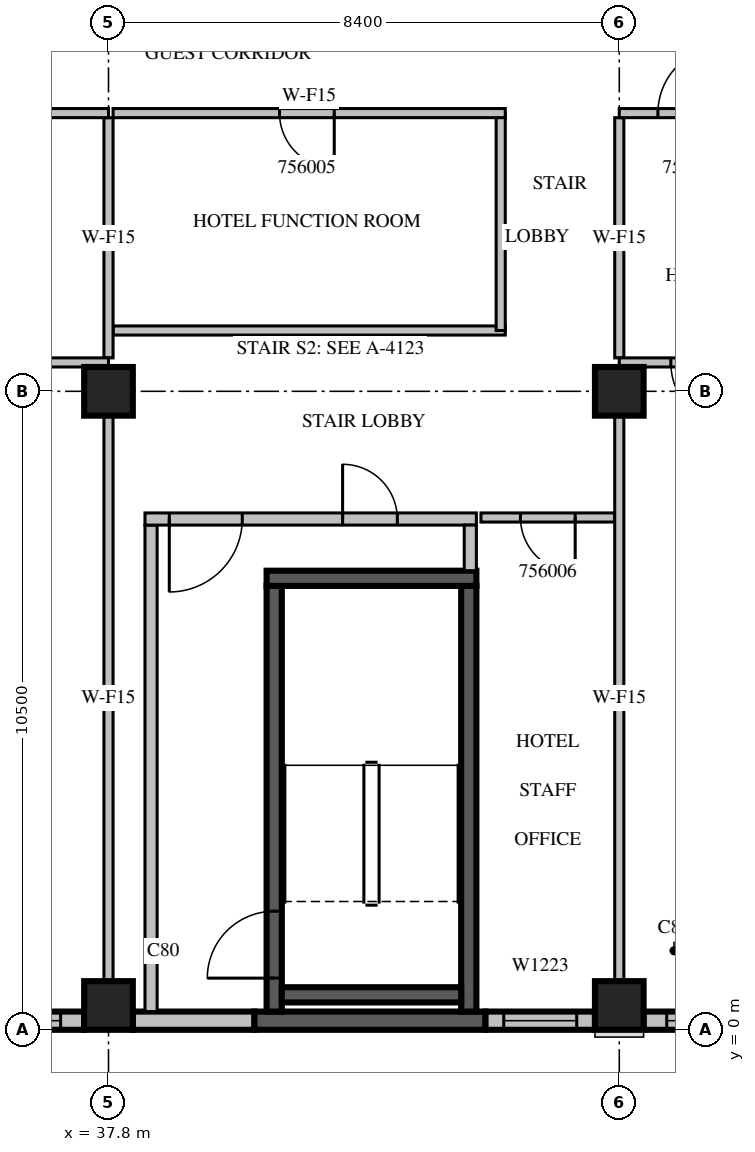
"""IFC4 building model, lengths in metres.
Left out: names, types, materials, properties, quantities, classifications, styles, units other than length and angle.
Written with IfcOpenShell. Run it as: python <this file> out.ifc"""

import sys

from ifc_helpers import new_model, si_unit, direction, frame, frame_2d, origin, origin_2d, place, context, subcontext, project, spatial, rectangle, extrude, source, transform, mapped, element, fill, save


model = new_model("IFC4")
c1 = context("Model", 3, precision=1e-05, world=origin(), true_north=direction((0.0, 1.0)))
c2 = subcontext(c1, "Body", "Model", "MODEL_VIEW")
j1 = project(units=[si_unit("LENGTHUNIT", "METRE"), si_unit("PLANEANGLEUNIT", "RADIAN")], contexts=[c1])
p1 = place(None, origin())
s1 = spatial("IfcSite", under=j1, at=p1, CompositionType="ELEMENT")
p2 = place(p1, origin())
s2 = spatial("IfcBuilding", under=s1, at=p2, CompositionType="ELEMENT")
p3 = place(p2, frame((0.0, 0.0, 246.2)))
s3 = spatial("IfcBuildingStorey", under=s2, at=p3, CompositionType="ELEMENT", Elevation=246.2)
m1 = source(origin(), c2, "Body", "SweptSolid", [
    extrude(rectangle(XDim=0.8, YDim=0.8, at=origin_2d()), origin(), (0.0, 0.0, 1.0), 3.8),
])
for number, where, z_axis, x_axis in (
    (1, (37.8, 0.4, 0.0), (0.0, 0.0, 1.0), (1.0, 0.0, 0.0)),
    (2, (46.2, 0.4, 0.0), (0.0, 0.0, 1.0), (1.0, 0.0, 0.0)),
    (3, (37.8, 10.5, 0.0), (0.0, 0.0, 1.0), (1.0, 0.0, 0.0)),
    (4, (46.2, 10.5, 0.0), (0.0, 0.0, 1.0), (1.0, 0.0, 0.0)),
):
    element("IfcColumn", number, at=place(p3, frame(where, z_axis=z_axis, x_axis=x_axis)), inside=s3, PredefinedType="COLUMN", context=c2, shape_type="MappedRepresentation", body=[
        mapped(m1, transform((0.0, 0.0, 0.0), scale=1.0)),
    ])
m2 = source(origin(), c2, "Body", "SweptSolid", [
    extrude(rectangle(XDim=7.6, YDim=0.3, at=frame_2d((3.8, 0.0))), origin(), (0.0, 0.0, 1.0), 3.4),
])
p4 = place(p3, frame((29.8, 0.15, 0.0), z_axis=(0.0, 0.0, 1.0), x_axis=(1.0, 0.0, 0.0)))
e5 = element("IfcWall", 5, at=p4, inside=s3, PredefinedType="STANDARD", context=c2, shape_type="MappedRepresentation", body=[
    mapped(m2, transform((0.0, 0.0, 0.0), scale=1.0)),
])
m3 = source(origin(), c2, "Body", "SweptSolid", [
    extrude(rectangle(XDim=1.2, YDim=2.3, at=frame_2d((0.6, 1.15))), frame((0.0, 0.16, 0.0), z_axis=(0.0, -1.0, 0.0), x_axis=(1.0, 0.0, 0.0)), (0.0, 0.0, 1.0), 0.32),
])
p5 = place(p4, frame((0.487, 0.0, 0.6)))
e6 = element("IfcOpeningElement", 6, at=p5, cuts=e5, PredefinedType="OPENING", context=c2, shape_type="MappedRepresentation", body=[
    mapped(m3, transform((0.0, 0.0, 0.0), scale=1.0)),
])
p6 = place(p4, frame((6.013, 0.0, 0.6)))
e7 = element("IfcOpeningElement", 7, at=p6, cuts=e5, PredefinedType="OPENING", context=c2, shape_type="MappedRepresentation", body=[
    mapped(m3, transform((0.0, 0.0, 0.0), scale=1.0)),
])
m4 = source(origin(), c2, "Body", "SweptSolid", [
    extrude(rectangle(XDim=2.4, YDim=2.3, at=frame_2d((1.2, 1.15))), frame((0.0, 0.16, 0.0), z_axis=(0.0, -1.0, 0.0), x_axis=(1.0, 0.0, 0.0)), (0.0, 0.0, 1.0), 0.32),
])
p7 = place(p4, frame((2.65, 0.0, 0.6)))
e8 = element("IfcOpeningElement", 8, at=p7, cuts=e5, PredefinedType="OPENING", context=c2, shape_type="MappedRepresentation", body=[
    mapped(m4, transform((0.0, 0.0, 0.0), scale=1.0)),
])
m5 = source(origin(), c2, "Body", "SweptSolid", [
    extrude(rectangle(XDim=2.0, YDim=0.3, at=frame_2d((1.0, 0.0))), origin(), (0.0, 0.0, 1.0), 3.4),
])
p8 = place(p3, frame((38.2, 0.15, 0.0), z_axis=(0.0, 0.0, 1.0), x_axis=(1.0, 0.0, 0.0)))
e9 = element("IfcWall", 9, at=p8, inside=s3, PredefinedType="STANDARD", context=c2, shape_type="MappedRepresentation", body=[
    mapped(m5, transform((0.0, 0.0, 0.0), scale=1.0)),
])
m6 = source(origin(), c2, "Body", "SweptSolid", [
    extrude(rectangle(XDim=3.8, YDim=0.3, at=frame_2d((1.9, 0.0))), origin(), (0.0, 0.0, 1.0), 3.4),
])
p9 = place(p3, frame((40.2, 0.15, 0.0), z_axis=(0.0, 0.0, 1.0), x_axis=(1.0, 0.0, 0.0)))
e10 = element("IfcWall", 10, at=p9, inside=s3, PredefinedType="SOLIDWALL", context=c2, shape_type="MappedRepresentation", body=[
    mapped(m6, transform((0.0, 0.0, 0.0), scale=1.0)),
])
m7 = source(origin(), c2, "Body", "SweptSolid", [
    extrude(rectangle(XDim=1.8, YDim=0.3, at=frame_2d((0.9, 0.0))), origin(), (0.0, 0.0, 1.0), 3.4),
])
p10 = place(p3, frame((44.0, 0.15, 0.0), z_axis=(0.0, 0.0, 1.0), x_axis=(1.0, 0.0, 0.0)))
e11 = element("IfcWall", 11, at=p10, inside=s3, PredefinedType="STANDARD", context=c2, shape_type="MappedRepresentation", body=[
    mapped(m7, transform((0.0, 0.0, 0.0), scale=1.0)),
])
p11 = place(p10, frame((0.3, 0.0, 0.6)))
e12 = element("IfcOpeningElement", 12, at=p11, cuts=e11, PredefinedType="OPENING", context=c2, shape_type="MappedRepresentation", body=[
    mapped(m3, transform((0.0, 0.0, 0.0), scale=1.0)),
])
m8 = source(origin(), c2, "Body", "SweptSolid", [
    extrude(rectangle(XDim=2.96, YDim=0.3, at=frame_2d((1.48, 0.0))), origin(), (0.0, 0.0, 1.0), 3.4),
])
p12 = place(p3, frame((46.6, 0.15, 0.0), z_axis=(0.0, 0.0, 1.0), x_axis=(1.0, 0.0, 0.0)))
e13 = element("IfcWall", 13, at=p12, inside=s3, PredefinedType="STANDARD", context=c2, shape_type="MappedRepresentation", body=[
    mapped(m8, transform((0.0, 0.0, 0.0), scale=1.0)),
])
m9 = source(origin(), c2, "Body", "SweptSolid", [
    extrude(rectangle(XDim=1.8, YDim=2.3, at=frame_2d((0.9, 1.15))), frame((0.0, 0.16, 0.0), z_axis=(0.0, -1.0, 0.0), x_axis=(1.0, 0.0, 0.0)), (0.0, 0.0, 1.0), 0.32),
])
p13 = place(p12, frame((0.38, 0.0, 0.6)))
e14 = element("IfcOpeningElement", 14, at=p13, cuts=e13, PredefinedType="OPENING", context=c2, shape_type="MappedRepresentation", body=[
    mapped(m9, transform((0.0, 0.0, 0.0), scale=1.0)),
])
m10 = source(origin(), c2, "Body", "SweptSolid", [
    extrude(rectangle(XDim=7.0, YDim=0.25, at=frame_2d((3.5, 0.0))), origin(), (0.0, 0.0, 1.0), 3.4),
])
p14 = place(p3, frame((40.525, 0.3, 0.0), z_axis=(0.0, 0.0, 1.0), x_axis=(0.0, 1.0, 0.0)))
e15 = element("IfcWall", 15, at=p14, inside=s3, PredefinedType="SOLIDWALL", context=c2, shape_type="MappedRepresentation", body=[
    mapped(m10, transform((0.0, 0.0, 0.0), scale=1.0)),
])
m11 = source(origin(), c2, "Body", "SweptSolid", [
    extrude(rectangle(XDim=1.1, YDim=2.1, at=frame_2d((0.55, 1.05))), frame((0.0, 0.135, 0.0), z_axis=(0.0, -1.0, 0.0), x_axis=(1.0, 0.0, 0.0)), (0.0, 0.0, 1.0), 0.27),
])
p15 = place(p14, frame((0.55, 0.0, 0.0)))
e16 = element("IfcOpeningElement", 16, at=p15, cuts=e15, PredefinedType="OPENING", context=c2, shape_type="MappedRepresentation", body=[
    mapped(m11, transform((0.0, 0.0, 0.0), scale=1.0)),
])
p16 = place(p3, frame((43.725, 0.3, 0.0), z_axis=(0.0, 0.0, 1.0), x_axis=(0.0, 1.0, 0.0)))
e17 = element("IfcWall", 17, at=p16, inside=s3, PredefinedType="SOLIDWALL", context=c2, shape_type="MappedRepresentation", body=[
    mapped(m10, transform((0.0, 0.0, 0.0), scale=1.0)),
])
m12 = source(origin(), c2, "Body", "SweptSolid", [
    extrude(rectangle(XDim=3.45, YDim=0.25, at=frame_2d((1.725, 0.0))), origin(), (0.0, 0.0, 1.0), 3.4),
])
p17 = place(p3, frame((40.4, 7.425, 0.0), z_axis=(0.0, 0.0, 1.0), x_axis=(1.0, 0.0, 0.0)))
e18 = element("IfcWall", 18, at=p17, inside=s3, PredefinedType="SOLIDWALL", context=c2, shape_type="MappedRepresentation", body=[
    mapped(m12, transform((0.0, 0.0, 0.0), scale=1.0)),
])
m13 = source(origin(), c2, "Body", "SweptSolid", [
    extrude(rectangle(XDim=2.95, YDim=0.25, at=frame_2d((1.475, 0.0))), origin(), (0.0, 0.0, 1.0), 3.4),
])
p18 = place(p3, frame((40.65, 0.575, 0.0), z_axis=(0.0, 0.0, 1.0), x_axis=(1.0, 0.0, 0.0)))
e19 = element("IfcWall", 19, at=p18, inside=s3, PredefinedType="SOLIDWALL", context=c2, shape_type="MappedRepresentation", body=[
    mapped(m13, transform((0.0, 0.0, 0.0), scale=1.0)),
])
m14 = source(origin(), c2, "Body", "SweptSolid", [
    extrude(rectangle(XDim=8.0, YDim=0.2, at=frame_2d((4.0, 0.0))), origin(), (0.0, 0.0, 1.0), 3.4),
])
p19 = place(p3, frame((38.5, 0.3, 0.0), z_axis=(0.0, 0.0, 1.0), x_axis=(0.0, 1.0, 0.0)))
e20 = element("IfcWall", 20, at=p19, inside=s3, PredefinedType="PARTITIONING", context=c2, shape_type="MappedRepresentation", body=[
    mapped(m14, transform((0.0, 0.0, 0.0), scale=1.0)),
])
m15 = source(origin(), c2, "Body", "SweptSolid", [
    extrude(rectangle(XDim=5.45, YDim=0.2, at=frame_2d((2.725, 0.0))), origin(), (0.0, 0.0, 1.0), 3.4),
])
p20 = place(p3, frame((38.4, 8.4, 0.0), z_axis=(0.0, 0.0, 1.0), x_axis=(1.0, 0.0, 0.0)))
e21 = element("IfcWall", 21, at=p20, inside=s3, PredefinedType="PARTITIONING", context=c2, shape_type="MappedRepresentation", body=[
    mapped(m15, transform((0.0, 0.0, 0.0), scale=1.0)),
])
m16 = source(origin(), c2, "Body", "SweptSolid", [
    extrude(rectangle(XDim=1.2, YDim=2.1, at=frame_2d((0.6, 1.05))), frame((0.0, 0.11, 0.0), z_axis=(0.0, -1.0, 0.0), x_axis=(1.0, 0.0, 0.0)), (0.0, 0.0, 1.0), 0.22),
])
p21 = place(p20, frame((0.4, 0.0, 0.0)))
e22 = element("IfcOpeningElement", 22, at=p21, cuts=e21, PredefinedType="OPENING", context=c2, shape_type="MappedRepresentation", body=[
    mapped(m16, transform((0.0, 0.0, 0.0), scale=1.0)),
])
m17 = source(origin(), c2, "Body", "SweptSolid", [
    extrude(rectangle(XDim=0.9, YDim=2.1, at=frame_2d((0.45, 1.05))), frame((0.0, 0.11, 0.0), z_axis=(0.0, -1.0, 0.0), x_axis=(1.0, 0.0, 0.0)), (0.0, 0.0, 1.0), 0.22),
])
p22 = place(p20, frame((3.25, 0.0, 0.0)))
e23 = element("IfcOpeningElement", 23, at=p22, cuts=e21, PredefinedType="OPENING", context=c2, shape_type="MappedRepresentation", body=[
    mapped(m17, transform((0.0, 0.0, 0.0), scale=1.0)),
])
m18 = source(origin(), c2, "Body", "SweptSolid", [
    extrude(rectangle(XDim=0.75, YDim=0.2, at=frame_2d((0.375, 0.0))), origin(), (0.0, 0.0, 1.0), 3.4),
])
p23 = place(p3, frame((43.75, 7.55, 0.0), z_axis=(0.0, 0.0, 1.0), x_axis=(0.0, 1.0, 0.0)))
e24 = element("IfcWall", 24, at=p23, inside=s3, PredefinedType="PARTITIONING", context=c2, shape_type="MappedRepresentation", body=[
    mapped(m18, transform((0.0, 0.0, 0.0), scale=1.0)),
])
m19 = source(origin(), c2, "Body", "SweptSolid", [
    extrude(rectangle(XDim=6.45, YDim=0.15, at=frame_2d((3.225, 0.0))), origin(), (0.0, 0.0, 1.0), 3.4),
])
p24 = place(p3, frame((37.875, 11.5, 0.0), z_axis=(0.0, 0.0, 1.0), x_axis=(1.0, 0.0, 0.0)))
e25 = element("IfcWall", 25, at=p24, inside=s3, PredefinedType="PARTITIONING", context=c2, shape_type="MappedRepresentation", body=[
    mapped(m19, transform((0.0, 0.0, 0.0), scale=1.0)),
])
m20 = source(origin(), c2, "Body", "SweptSolid", [
    extrude(rectangle(XDim=3.575, YDim=0.15, at=frame_2d((1.788, 0.0))), origin(), (0.0, 0.0, 1.0), 3.4),
])
p25 = place(p3, frame((44.25, 11.5, 0.0), z_axis=(0.0, 0.0, 1.0), x_axis=(0.0, 1.0, 0.0)))
e26 = element("IfcWall", 26, at=p25, inside=s3, PredefinedType="PARTITIONING", context=c2, shape_type="MappedRepresentation", body=[
    mapped(m20, transform((0.0, 0.0, 0.0), scale=1.0)),
])
p26 = place(p3, frame((44.325, 15.075, 0.0), z_axis=(0.0, 0.0, 1.0), x_axis=(-1.0, 0.0, 0.0)))
e27 = element("IfcWall", 27, at=p26, inside=s3, PredefinedType="PARTITIONING", context=c2, shape_type="MappedRepresentation", body=[
    mapped(m19, transform((0.0, 0.0, 0.0), scale=1.0)),
])
m21 = source(origin(), c2, "Body", "SweptSolid", [
    extrude(rectangle(XDim=0.9, YDim=2.1, at=frame_2d((0.45, 1.05))), frame((0.0, 0.085, 0.0), z_axis=(0.0, -1.0, 0.0), x_axis=(1.0, 0.0, 0.0)), (0.0, 0.0, 1.0), 0.17),
])
p27 = place(p26, frame((2.812, 0.0, 0.0)))
e28 = element("IfcOpeningElement", 28, at=p27, cuts=e27, PredefinedType="OPENING", context=c2, shape_type="MappedRepresentation", body=[
    mapped(m21, transform((0.0, 0.0, 0.0), scale=1.0)),
])
m22 = source(origin(), c2, "Body", "SweptSolid", [
    extrude(rectangle(XDim=2.2, YDim=0.15, at=frame_2d((1.1, 0.0))), origin(), (0.0, 0.0, 1.0), 3.4),
])
p28 = place(p3, frame((46.125, 8.425, 0.0), z_axis=(0.0, 0.0, 1.0), x_axis=(-1.0, 0.0, 0.0)))
e29 = element("IfcWall", 29, at=p28, inside=s3, PredefinedType="PARTITIONING", context=c2, shape_type="MappedRepresentation", body=[
    mapped(m22, transform((0.0, 0.0, 0.0), scale=1.0)),
])
p29 = place(p28, frame((0.65, 0.0, 0.0)))
e30 = element("IfcOpeningElement", 30, at=p29, cuts=e29, PredefinedType="OPENING", context=c2, shape_type="MappedRepresentation", body=[
    mapped(m21, transform((0.0, 0.0, 0.0), scale=1.0)),
])
m23 = source(origin(), c2, "Body", "SweptSolid", [
    extrude(rectangle(XDim=9.302, YDim=0.15, at=frame_2d((4.651, 0.0))), origin(), (0.0, 0.0, 1.0), 3.4),
])
p30 = place(p3, frame((37.8, 0.799, 0.0), z_axis=(0.0, 0.0, 1.0), x_axis=(0.0, 1.0, 0.0)))
e31 = element("IfcWall", 31, at=p30, inside=s3, PredefinedType="PARTITIONING", context=c2, shape_type="MappedRepresentation", body=[
    mapped(m23, transform((0.0, 0.0, 0.0), scale=1.0)),
])
m24 = source(origin(), c2, "Body", "SweptSolid", [
    extrude(rectangle(XDim=3.95, YDim=0.15, at=frame_2d((1.975, 0.0))), origin(), (0.0, 0.0, 1.0), 3.4),
])
p31 = place(p3, frame((37.8, 11.05, 0.0), z_axis=(0.0, 0.0, 1.0), x_axis=(0.0, 1.0, 0.0)))
e32 = element("IfcWall", 32, at=p31, inside=s3, PredefinedType="PARTITIONING", context=c2, shape_type="MappedRepresentation", body=[
    mapped(m24, transform((0.0, 0.0, 0.0), scale=1.0)),
])
m25 = source(origin(), c2, "Body", "SweptSolid", [
    extrude(rectangle(XDim=8.4, YDim=0.15, at=frame_2d((4.2, 0.0))), origin(), (0.0, 0.0, 1.0), 3.4),
])
p32 = place(p3, frame((37.8, 10.975, 0.0), z_axis=(0.0, 0.0, 1.0), x_axis=(-1.0, 0.0, 0.0)))
e33 = element("IfcWall", 33, at=p32, inside=s3, PredefinedType="PARTITIONING", context=c2, shape_type="MappedRepresentation", body=[
    mapped(m25, transform((0.0, 0.0, 0.0), scale=1.0)),
])
m26 = source(origin(), c2, "Body", "SweptSolid", [
    extrude(rectangle(XDim=1.1, YDim=2.1, at=frame_2d((0.55, 1.05))), frame((0.0, 0.085, 0.0), z_axis=(0.0, -1.0, 0.0), x_axis=(1.0, 0.0, 0.0)), (0.0, 0.0, 1.0), 0.17),
])
p33 = place(p32, frame((6.449, 0.0, 0.0)))
e34 = element("IfcOpeningElement", 34, at=p33, cuts=e33, PredefinedType="OPENING", context=c2, shape_type="MappedRepresentation", body=[
    mapped(m26, transform((0.0, 0.0, 0.0), scale=1.0)),
])
p34 = place(p32, frame((4.12, 0.0, 0.0)))
e35 = element("IfcOpeningElement", 35, at=p34, cuts=e33, PredefinedType="OPENING", context=c2, shape_type="MappedRepresentation", body=[
    mapped(m21, transform((0.0, 0.0, 0.0), scale=1.0)),
])
p35 = place(p32, frame((1.321, 0.0, 0.0)))
e36 = element("IfcOpeningElement", 36, at=p35, cuts=e33, PredefinedType="OPENING", context=c2, shape_type="MappedRepresentation", body=[
    mapped(m21, transform((0.0, 0.0, 0.0), scale=1.0)),
])
p36 = place(p3, frame((46.2, 0.799, 0.0), z_axis=(0.0, 0.0, 1.0), x_axis=(0.0, 1.0, 0.0)))
e37 = element("IfcWall", 37, at=p36, inside=s3, PredefinedType="PARTITIONING", context=c2, shape_type="MappedRepresentation", body=[
    mapped(m23, transform((0.0, 0.0, 0.0), scale=1.0)),
])
p37 = place(p3, frame((46.2, 11.05, 0.0), z_axis=(0.0, 0.0, 1.0), x_axis=(0.0, 1.0, 0.0)))
e38 = element("IfcWall", 38, at=p37, inside=s3, PredefinedType="PARTITIONING", context=c2, shape_type="MappedRepresentation", body=[
    mapped(m24, transform((0.0, 0.0, 0.0), scale=1.0)),
])
m27 = source(origin(), c2, "Body", "SweptSolid", [
    extrude(rectangle(XDim=7.26, YDim=0.15, at=frame_2d((3.63, 0.0))), origin(), (0.0, 0.0, 1.0), 3.4),
])
p38 = place(p3, frame((53.46, 10.975, 0.0), z_axis=(0.0, 0.0, 1.0), x_axis=(-1.0, 0.0, 0.0)))
e39 = element("IfcWall", 39, at=p38, inside=s3, PredefinedType="PARTITIONING", context=c2, shape_type="MappedRepresentation", body=[
    mapped(m27, transform((0.0, 0.0, 0.0), scale=1.0)),
])
p39 = place(p38, frame((5.313, 0.0, 0.0)))
e40 = element("IfcOpeningElement", 40, at=p39, cuts=e39, PredefinedType="OPENING", context=c2, shape_type="MappedRepresentation", body=[
    mapped(m26, transform((0.0, 0.0, 0.0), scale=1.0)),
])
p40 = place(p38, frame((3.414, 0.0, 0.0)))
e41 = element("IfcOpeningElement", 41, at=p40, cuts=e39, PredefinedType="OPENING", context=c2, shape_type="MappedRepresentation", body=[
    mapped(m21, transform((0.0, 0.0, 0.0), scale=1.0)),
])
p41 = place(p38, frame((1.831, 0.0, 0.0)))
e42 = element("IfcOpeningElement", 42, at=p41, cuts=e39, PredefinedType="OPENING", context=c2, shape_type="MappedRepresentation", body=[
    mapped(m21, transform((0.0, 0.0, 0.0), scale=1.0)),
])
p42 = place(p3, frame((37.8, 15.075, 0.0), z_axis=(0.0, 0.0, 1.0), x_axis=(-1.0, 0.0, 0.0)))
e43 = element("IfcWall", 43, at=p42, inside=s3, PredefinedType="PARTITIONING", context=c2, shape_type="MappedRepresentation", body=[
    mapped(m25, transform((0.0, 0.0, 0.0), scale=1.0)),
])
p43 = place(p42, frame((6.662, 0.0, 0.0)))
e44 = element("IfcOpeningElement", 44, at=p43, cuts=e43, PredefinedType="OPENING", context=c2, shape_type="MappedRepresentation", body=[
    mapped(m26, transform((0.0, 0.0, 0.0), scale=1.0)),
])
p44 = place(p3, frame((53.46, 15.075, 0.0), z_axis=(0.0, 0.0, 1.0), x_axis=(-1.0, 0.0, 0.0)))
e45 = element("IfcWall", 45, at=p44, inside=s3, PredefinedType="PARTITIONING", context=c2, shape_type="MappedRepresentation", body=[
    mapped(m27, transform((0.0, 0.0, 0.0), scale=1.0)),
])
p45 = place(p44, frame((5.525, 0.0, 0.0)))
e46 = element("IfcOpeningElement", 46, at=p45, cuts=e45, PredefinedType="OPENING", context=c2, shape_type="MappedRepresentation", body=[
    mapped(m26, transform((0.0, 0.0, 0.0), scale=1.0)),
])
m28 = source(origin(), c2, "Body", "SweptSolid", [
    extrude(rectangle(XDim=1.2, YDim=2.3, at=frame_2d((0.6, 1.15))), frame((0.0, 0.03, 0.0), z_axis=(0.0, -1.0, 0.0), x_axis=(1.0, 0.0, 0.0)), (0.0, 0.0, 1.0), 0.06),
])
p46 = place(p6, origin())
e47 = element("IfcWindow", 47, at=p46, inside=s3, PartitioningType="SINGLE_PANEL", PredefinedType="WINDOW", context=c2, shape_type="MappedRepresentation", body=[
    mapped(m28, transform((0.0, 0.0, 0.0), scale=1.0)),
])
fill(e7, e47)
p47 = place(p11, origin())
e48 = element("IfcWindow", 48, at=p47, inside=s3, PartitioningType="SINGLE_PANEL", PredefinedType="WINDOW", context=c2, shape_type="MappedRepresentation", body=[
    mapped(m28, transform((0.0, 0.0, 0.0), scale=1.0)),
])
fill(e12, e48)
m29 = source(origin(), c2, "Body", "SweptSolid", [
    extrude(rectangle(XDim=1.8, YDim=2.3, at=frame_2d((0.9, 1.15))), frame((0.0, 0.03, 0.0), z_axis=(0.0, -1.0, 0.0), x_axis=(1.0, 0.0, 0.0)), (0.0, 0.0, 1.0), 0.06),
])
p48 = place(p13, origin())
e49 = element("IfcWindow", 49, at=p48, inside=s3, PartitioningType="SINGLE_PANEL", PredefinedType="WINDOW", context=c2, shape_type="MappedRepresentation", body=[
    mapped(m29, transform((0.0, 0.0, 0.0), scale=1.0)),
])
fill(e14, e49)
m30 = source(origin(), c2, "Body", "SweptSolid", [
    extrude(rectangle(XDim=1.1, YDim=2.1, at=frame_2d((0.55, 1.05))), frame((0.0, 0.025, 0.0), z_axis=(0.0, -1.0, 0.0), x_axis=(1.0, 0.0, 0.0)), (0.0, 0.0, 1.0), 0.05),
])
p49 = place(p15, origin())
e50 = element("IfcDoor", 50, at=p49, inside=s3, OperationType="SINGLE_SWING_LEFT", PredefinedType="DOOR", context=c2, shape_type="MappedRepresentation", body=[
    mapped(m30, transform((0.0, 0.0, 0.0), scale=1.0)),
])
fill(e16, e50)
m31 = source(origin(), c2, "Body", "SweptSolid", [
    extrude(rectangle(XDim=1.2, YDim=2.1, at=frame_2d((0.6, 1.05))), frame((0.0, 0.025, 0.0), z_axis=(0.0, -1.0, 0.0), x_axis=(1.0, 0.0, 0.0)), (0.0, 0.0, 1.0), 0.05),
])
p50 = place(p21, origin())
e51 = element("IfcDoor", 51, at=p50, inside=s3, OperationType="SINGLE_SWING_RIGHT", PredefinedType="DOOR", context=c2, shape_type="MappedRepresentation", body=[
    mapped(m31, transform((0.0, 0.0, 0.0), scale=1.0)),
])
fill(e22, e51)
m32 = source(origin(), c2, "Body", "SweptSolid", [
    extrude(rectangle(XDim=0.9, YDim=2.1, at=frame_2d((0.45, 1.05))), frame((0.0, 0.025, 0.0), z_axis=(0.0, -1.0, 0.0), x_axis=(1.0, 0.0, 0.0)), (0.0, 0.0, 1.0), 0.05),
])
p51 = place(p22, origin())
e52 = element("IfcDoor", 52, at=p51, inside=s3, OperationType="SINGLE_SWING_LEFT", PredefinedType="DOOR", context=c2, shape_type="MappedRepresentation", body=[
    mapped(m32, transform((0.0, 0.0, 0.0), scale=1.0)),
])
fill(e23, e52)
p52 = place(p27, origin())
e53 = element("IfcDoor", 53, at=p52, inside=s3, OperationType="SINGLE_SWING_LEFT", PredefinedType="DOOR", context=c2, shape_type="MappedRepresentation", body=[
    mapped(m32, transform((0.0, 0.0, 0.0), scale=1.0)),
])
fill(e28, e53)
p53 = place(p29, origin())
e54 = element("IfcDoor", 54, at=p53, inside=s3, OperationType="SINGLE_SWING_LEFT", PredefinedType="DOOR", context=c2, shape_type="MappedRepresentation", body=[
    mapped(m32, transform((0.0, 0.0, 0.0), scale=1.0)),
])
fill(e30, e54)
p54 = place(p45, origin())
e55 = element("IfcDoor", 55, at=p54, inside=s3, OperationType="SINGLE_SWING_RIGHT", PredefinedType="DOOR", context=c2, shape_type="MappedRepresentation", body=[
    mapped(m30, transform((0.0, 0.0, 0.0), scale=1.0)),
])
fill(e46, e55)
p55 = place(p39, origin())
e56 = element("IfcDoor", 56, at=p55, inside=s3, OperationType="SINGLE_SWING_LEFT", PredefinedType="DOOR", context=c2, shape_type="MappedRepresentation", body=[
    mapped(m30, transform((0.0, 0.0, 0.0), scale=1.0)),
])
fill(e40, e56)
save(model, sys.argv[1])
